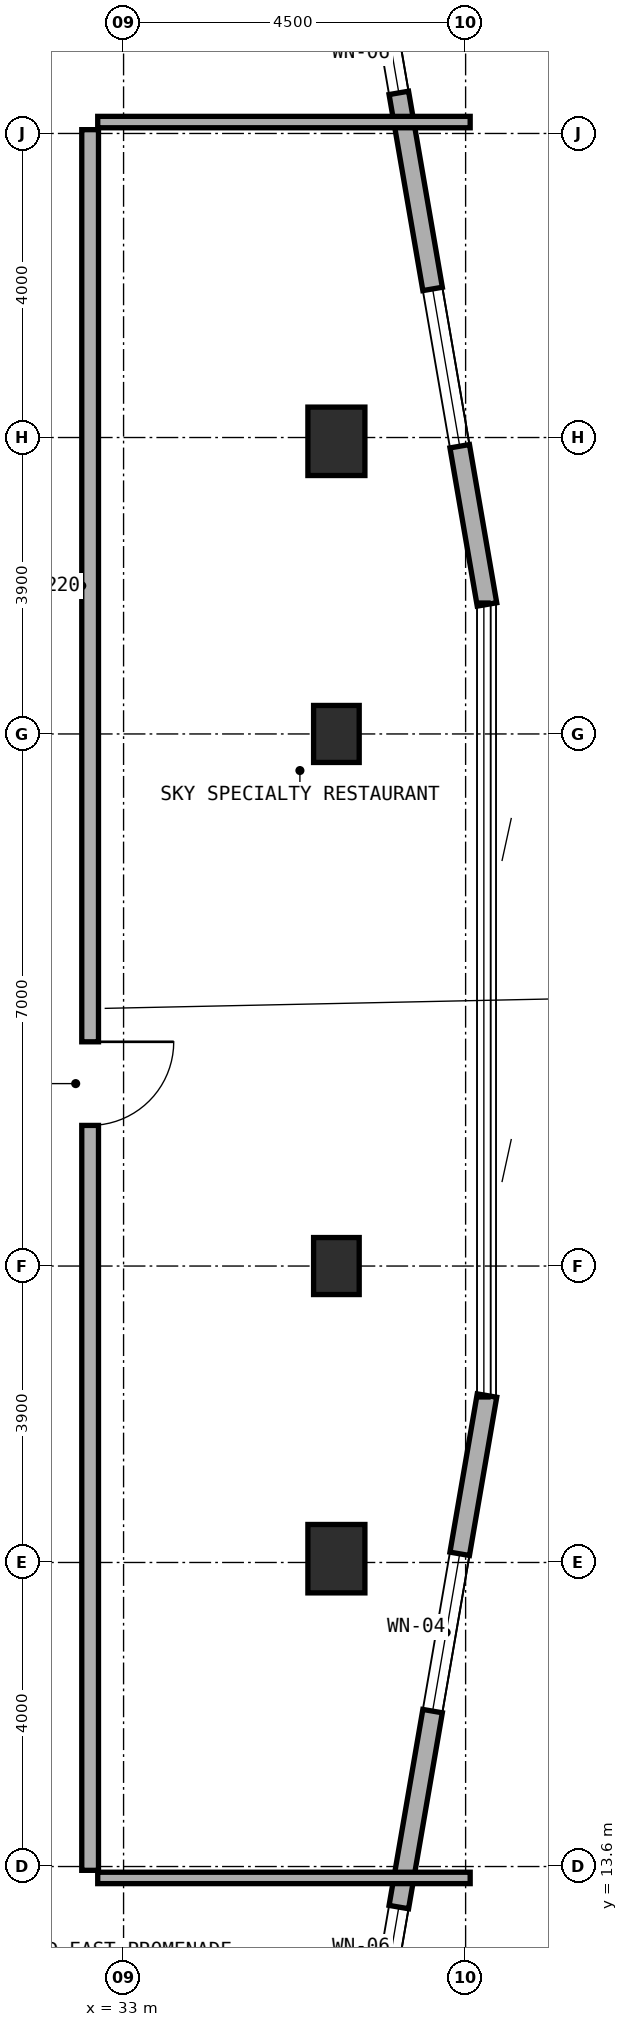
"""IFC4 building model, lengths in metres.
Left out: names, types, materials, properties, quantities, classifications, styles, units other than length and angle.
Written with IfcOpenShell. Run it as: python <this file> out.ifc"""

import sys

from ifc_helpers import new_model, si_unit, direction, frame, frame_2d, origin, origin_2d, place, context, subcontext, project, spatial, rectangle, extrude, element, fill, save


model = new_model("IFC4")
c1 = context("Model", 3, precision=1e-05, world=origin(), true_north=direction((0.0, 1.0)))
c2 = subcontext(c1, "Body", "Model", "MODEL_VIEW")
j1 = project(units=[si_unit("LENGTHUNIT", "METRE"), si_unit("PLANEANGLEUNIT", "RADIAN")], contexts=[c1])
p1 = place(None, origin())
s1 = spatial("IfcSite", under=j1, at=p1, CompositionType="ELEMENT")
p2 = place(p1, origin())
s2 = spatial("IfcBuilding", under=s1, at=p2, CompositionType="ELEMENT")
p3 = place(p2, frame((0.0, 0.0, 264.8)))
s3 = spatial("IfcBuildingStorey", under=s2, at=p3, CompositionType="ELEMENT", Elevation=264.8)
for number, where, z_axis, x_axis in (
    (1, (35.8, 21.5, 0.0), (0.0, 0.0, 1.0), (1.0, 0.0, 0.0)),
    (2, (35.8, 28.5, 0.0), (0.0, 0.0, 1.0), (1.0, 0.0, 0.0)),
):
    element("IfcColumn", number, at=place(p3, frame(where, z_axis=z_axis, x_axis=x_axis)), inside=s3, PredefinedType="COLUMN", context=c2, shape_type="SweptSolid", body=[
        extrude(rectangle(XDim=0.6, YDim=0.75, at=origin_2d()), origin(), (0.0, 0.0, 1.0), 3.6),
    ])
for number, where, z_axis, x_axis in (
    (3, (35.8, 17.65, 0.0), (0.0, 0.0, 1.0), (1.0, 0.0, 0.0)),
    (4, (35.8, 32.35, 0.0), (0.0, 0.0, 1.0), (1.0, 0.0, 0.0)),
):
    element("IfcColumn", number, at=place(p3, frame(where, z_axis=z_axis, x_axis=x_axis)), inside=s3, PredefinedType="COLUMN", context=c2, shape_type="SweptSolid", body=[
        extrude(rectangle(XDim=0.75, YDim=0.9, at=origin_2d()), origin(), (0.0, 0.0, 1.0), 3.6),
    ])
p4 = place(p3, frame((36.371, 11.614, 0.0), z_axis=(0.0, 0.0, 1.0), x_axis=(0.169818291056, 0.985475391891, 0.0)))
e5 = element("IfcWall", 5, at=p4, inside=s3, PredefinedType="STANDARD", context=c2, shape_type="SweptSolid", body=[
    extrude(rectangle(XDim=8.302, YDim=0.26, at=frame_2d((4.151, 0.0))), origin(), (0.0, 0.0, 1.0), 3.32),
])
p5 = place(p4, frame((0.274, 0.0, 0.5)))
e6 = element("IfcOpeningElement", 6, at=p5, cuts=e5, PredefinedType="OPENING", context=c2, shape_type="SweptSolid", body=[
    extrude(rectangle(XDim=1.2, YDim=1.9, at=frame_2d((0.6, 0.95))), frame((0.0, 0.14, 0.0), z_axis=(0.0, -1.0, 0.0), x_axis=(1.0, 0.0, 0.0)), (0.0, 0.0, 1.0), 0.28),
])
p6 = place(p4, frame((4.09, 0.0, 0.85)))
e7 = element("IfcOpeningElement", 7, at=p6, cuts=e5, PredefinedType="OPENING", context=c2, shape_type="SweptSolid", body=[
    extrude(rectangle(XDim=2.1, YDim=1.5, at=frame_2d((1.05, 0.75))), frame((0.0, 0.14, 0.0), z_axis=(0.0, -1.0, 0.0), x_axis=(1.0, 0.0, 0.0)), (0.0, 0.0, 1.0), 0.28),
])
p7 = place(p3, frame((37.781, 30.204, 0.0), z_axis=(0.0, 0.0, 1.0), x_axis=(-0.169818291056, 0.985475391891, 0.0)))
e8 = element("IfcWall", 8, at=p7, inside=s3, PredefinedType="STANDARD", context=c2, shape_type="SweptSolid", body=[
    extrude(rectangle(XDim=8.302, YDim=0.26, at=frame_2d((4.151, 0.0))), origin(), (0.0, 0.0, 1.0), 3.32),
])
p8 = place(p7, frame((2.112, 0.0, 0.85)))
e9 = element("IfcOpeningElement", 9, at=p8, cuts=e8, PredefinedType="OPENING", context=c2, shape_type="SweptSolid", body=[
    extrude(rectangle(XDim=2.1, YDim=1.5, at=frame_2d((1.05, 0.75))), frame((0.0, 0.14, 0.0), z_axis=(0.0, -1.0, 0.0), x_axis=(1.0, 0.0, 0.0)), (0.0, 0.0, 1.0), 0.28),
])
p9 = place(p7, frame((6.829, 0.0, 0.5)))
e10 = element("IfcOpeningElement", 10, at=p9, cuts=e8, PredefinedType="OPENING", context=c2, shape_type="SweptSolid", body=[
    extrude(rectangle(XDim=1.2, YDim=1.9, at=frame_2d((0.6, 0.95))), frame((0.0, 0.14, 0.0), z_axis=(0.0, -1.0, 0.0), x_axis=(1.0, 0.0, 0.0)), (0.0, 0.0, 1.0), 0.28),
])
for number, where, z_axis, x_axis in (
    (11, (32.66, 13.45, 0.0), (0.0, 0.0, 1.0), (1.0, 0.0, 0.0)),
    (12, (32.66, 36.55, 0.0), (0.0, 0.0, 1.0), (1.0, 0.0, 0.0)),
):
    element("IfcWall", number, at=place(p3, frame(where, z_axis=z_axis, x_axis=x_axis)), inside=s3, PredefinedType="PARTITIONING", context=c2, shape_type="SweptSolid", body=[
        extrude(rectangle(XDim=4.9, YDim=0.15, at=frame_2d((2.45, 0.0))), origin(), (0.0, 0.0, 1.0), 2.795),
    ])
p10 = place(p3, frame((32.56, 13.55, 0.0), z_axis=(0.0, 0.0, 1.0), x_axis=(0.0, 1.0, 0.0)))
e13 = element("IfcWall", 13, at=p10, inside=s3, PredefinedType="SOLIDWALL", context=c2, shape_type="SweptSolid", body=[
    extrude(rectangle(XDim=22.9, YDim=0.22, at=frame_2d((11.45, 0.0))), origin(), (0.0, 0.0, 1.0), 2.795),
])
p11 = place(p10, frame((9.8, 0.0, 0.0)))
e14 = element("IfcOpeningElement", 14, at=p11, cuts=e13, PredefinedType="OPENING", context=c2, shape_type="SweptSolid", body=[
    extrude(rectangle(XDim=1.1, YDim=2.1, at=frame_2d((0.55, 1.05))), frame((0.0, 0.12, 0.0), z_axis=(0.0, -1.0, 0.0), x_axis=(1.0, 0.0, 0.0)), (0.0, 0.0, 1.0), 0.24),
])
p12 = place(p5, origin())
e15 = element("IfcWindow", 15, at=p12, inside=s3, PartitioningType="SINGLE_PANEL", PredefinedType="WINDOW", context=c2, shape_type="SweptSolid", body=[
    extrude(rectangle(XDim=1.2, YDim=1.9, at=frame_2d((0.6, 0.95))), frame((0.0, 0.03, 0.0), z_axis=(0.0, -1.0, 0.0), x_axis=(1.0, 0.0, 0.0)), (0.0, 0.0, 1.0), 0.06),
])
fill(e6, e15)
p13 = place(p6, origin())
e16 = element("IfcWindow", 16, at=p13, inside=s3, PartitioningType="SINGLE_PANEL", PredefinedType="WINDOW", context=c2, shape_type="SweptSolid", body=[
    extrude(rectangle(XDim=2.1, YDim=1.5, at=frame_2d((1.05, 0.75))), frame((0.0, 0.03, 0.0), z_axis=(0.0, -1.0, 0.0), x_axis=(1.0, 0.0, 0.0)), (0.0, 0.0, 1.0), 0.06),
])
fill(e7, e16)
p14 = place(p8, origin())
e17 = element("IfcWindow", 17, at=p14, inside=s3, PartitioningType="SINGLE_PANEL", PredefinedType="WINDOW", context=c2, shape_type="SweptSolid", body=[
    extrude(rectangle(XDim=2.1, YDim=1.5, at=frame_2d((1.05, 0.75))), frame((0.0, 0.03, 0.0), z_axis=(0.0, -1.0, 0.0), x_axis=(1.0, 0.0, 0.0)), (0.0, 0.0, 1.0), 0.06),
])
fill(e9, e17)
p15 = place(p9, origin())
e18 = element("IfcWindow", 18, at=p15, inside=s3, PartitioningType="SINGLE_PANEL", PredefinedType="WINDOW", context=c2, shape_type="SweptSolid", body=[
    extrude(rectangle(XDim=1.2, YDim=1.9, at=frame_2d((0.6, 0.95))), frame((0.0, 0.03, 0.0), z_axis=(0.0, -1.0, 0.0), x_axis=(1.0, 0.0, 0.0)), (0.0, 0.0, 1.0), 0.06),
])
fill(e10, e18)
p16 = place(p11, frame((1.1, 0.0, 0.0), z_axis=(0.0, 0.0, 1.0), x_axis=(-1.0, 0.0, 0.0)))
e19 = element("IfcDoor", 19, at=p16, inside=s3, OperationType="SINGLE_SWING_LEFT", PredefinedType="DOOR", context=c2, shape_type="SweptSolid", body=[
    extrude(rectangle(XDim=1.1, YDim=2.1, at=frame_2d((0.55, 1.05))), frame((0.0, 0.025, 0.0), z_axis=(0.0, -1.0, 0.0), x_axis=(1.0, 0.0, 0.0)), (0.0, 0.0, 1.0), 0.05),
])
fill(e14, e19)
save(model, sys.argv[1])
